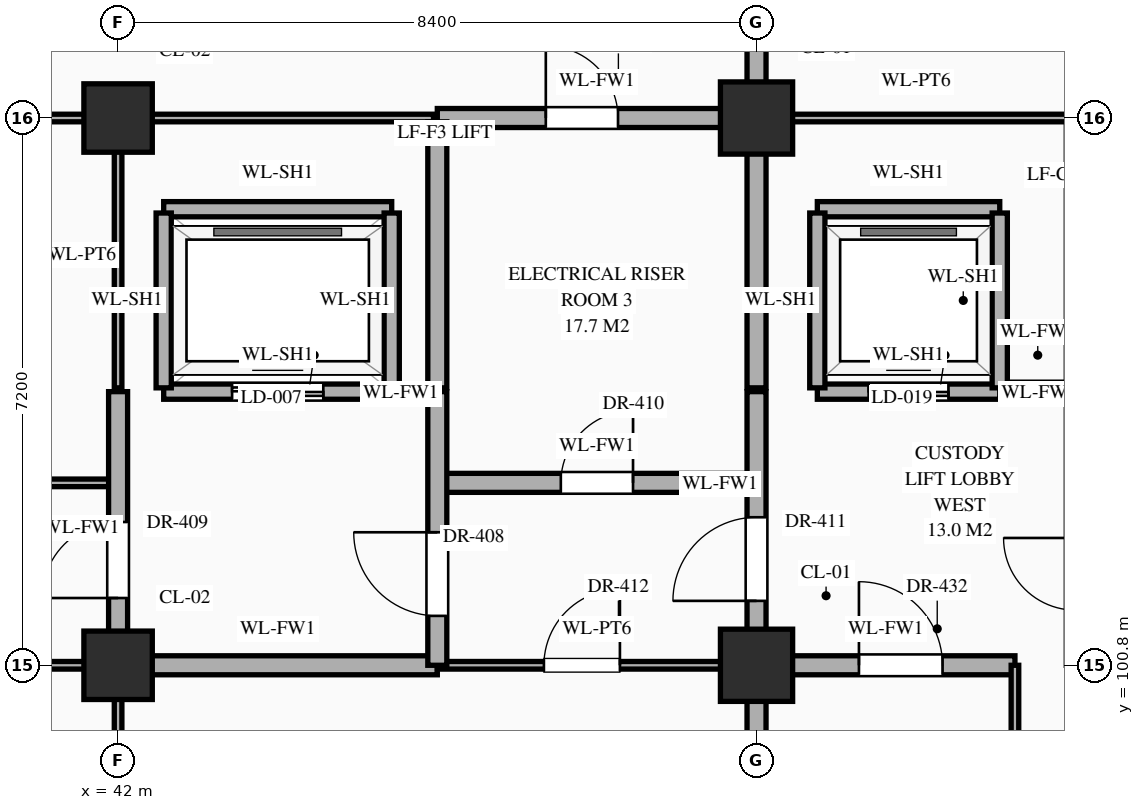
"""IFC4 building model, lengths in metres.
Left out: names, types, materials, properties, quantities, classifications, styles, units other than length and angle.
Written with IfcOpenShell. Run it as: python <this file> out.ifc"""

import sys

from ifc_helpers import new_model, si_unit, direction, frame, frame_2d, origin, origin_2d, place, context, subcontext, project, spatial, rectangle, extrude, element, fill, save


model = new_model("IFC4")
c1 = context("Model", 3, precision=1e-05, world=origin(), true_north=direction((0.0, 1.0)))
c2 = subcontext(c1, "Body", "Model", "MODEL_VIEW")
j1 = project(units=[si_unit("LENGTHUNIT", "METRE"), si_unit("PLANEANGLEUNIT", "RADIAN")], contexts=[c1])
p1 = place(None, origin())
s1 = spatial("IfcSite", under=j1, at=p1, CompositionType="ELEMENT")
p2 = place(p1, origin())
s2 = spatial("IfcBuilding", under=s1, at=p2, CompositionType="ELEMENT")
p3 = place(p2, frame((0.0, 0.0, -5.4)))
s3 = spatial("IfcBuildingStorey", under=s2, at=p3, CompositionType="ELEMENT", Elevation=-5.4)
for number, where, z_axis, x_axis in (
    (1, (42.0, 100.8, 0.0), (0.0, 0.0, 1.0), (1.0, 0.0, 0.0)),
    (2, (42.0, 108.0, 0.0), (0.0, 0.0, 1.0), (1.0, 0.0, 0.0)),
):
    element("IfcColumn", number, at=place(p3, frame(where, z_axis=z_axis, x_axis=x_axis)), inside=s3, PredefinedType="COLUMN", context=c2, shape_type="SweptSolid", body=[
        extrude(rectangle(XDim=0.9, YDim=0.9, at=origin_2d()), origin(), (0.0, 0.0, 1.0), 5.4),
    ])
for number, where, z_axis, x_axis in (
    (3, (50.4, 100.8, 0.0), (0.0, 0.0, 1.0), (1.0, 0.0, 0.0)),
    (4, (50.4, 108.0, 0.0), (0.0, 0.0, 1.0), (1.0, 0.0, 0.0)),
):
    element("IfcColumn", number, at=place(p3, frame(where, z_axis=z_axis, x_axis=x_axis)), inside=s3, PredefinedType="COLUMN", context=c2, shape_type="SweptSolid", body=[
        extrude(rectangle(XDim=0.95, YDim=0.95, at=origin_2d()), origin(), (0.0, 0.0, 1.0), 5.4),
    ])
p4 = place(p3, frame((16.8, 100.8, 0.0), z_axis=(0.0, 0.0, 1.0), x_axis=(1.0, 0.0, 0.0)))
e5 = element("IfcWall", 5, at=p4, inside=s3, PredefinedType="STANDARD", context=c2, shape_type="SweptSolid", body=[
    extrude(rectangle(XDim=25.2, YDim=0.1, at=frame_2d((12.6, 0.0))), origin(), (0.0, 0.0, 1.0), 4.25),
])
p5 = place(p4, frame((3.587, 0.0, 0.0)))
e6 = element("IfcOpeningElement", 6, at=p5, cuts=e5, PredefinedType="OPENING", context=c2, shape_type="SweptSolid", body=[
    extrude(rectangle(XDim=1.2, YDim=2.35, at=frame_2d((0.6, 1.175))), frame((0.0, 0.062, 0.0), z_axis=(0.0, -1.0, 0.0), x_axis=(1.0, 0.0, 0.0)), (0.0, 0.0, 1.0), 0.124),
])
p6 = place(p4, frame((9.665, 0.0, 0.0)))
e7 = element("IfcOpeningElement", 7, at=p6, cuts=e5, PredefinedType="OPENING", context=c2, shape_type="SweptSolid", body=[
    extrude(rectangle(XDim=1.24, YDim=2.3, at=frame_2d((0.62, 1.15))), frame((0.0, 0.062, 0.0), z_axis=(0.0, -1.0, 0.0), x_axis=(1.0, 0.0, 0.0)), (0.0, 0.0, 1.0), 0.124),
])
p7 = place(p4, frame((12.36, 0.0, 0.0)))
e8 = element("IfcOpeningElement", 8, at=p7, cuts=e5, PredefinedType="OPENING", context=c2, shape_type="SweptSolid", body=[
    extrude(rectangle(XDim=1.28, YDim=2.35, at=frame_2d((0.64, 1.175))), frame((0.0, 0.062, 0.0), z_axis=(0.0, -1.0, 0.0), x_axis=(1.0, 0.0, 0.0)), (0.0, 0.0, 1.0), 0.124),
])
p8 = place(p4, frame((14.845, 0.0, 0.0)))
e9 = element("IfcOpeningElement", 9, at=p8, cuts=e5, PredefinedType="OPENING", context=c2, shape_type="SweptSolid", body=[
    extrude(rectangle(XDim=0.94, YDim=2.3, at=frame_2d((0.47, 1.15))), frame((0.0, 0.062, 0.0), z_axis=(0.0, -1.0, 0.0), x_axis=(1.0, 0.0, 0.0)), (0.0, 0.0, 1.0), 0.124),
])
p9 = place(p4, frame((20.51, 0.0, 0.0)))
e10 = element("IfcOpeningElement", 10, at=p9, cuts=e5, PredefinedType="OPENING", context=c2, shape_type="SweptSolid", body=[
    extrude(rectangle(XDim=0.98, YDim=2.35, at=frame_2d((0.49, 1.175))), frame((0.0, 0.062, 0.0), z_axis=(0.0, -1.0, 0.0), x_axis=(1.0, 0.0, 0.0)), (0.0, 0.0, 1.0), 0.124),
])
p10 = place(p3, frame((42.0, 100.8, 0.0), z_axis=(0.0, 0.0, 1.0), x_axis=(1.0, 0.0, 0.0)))
e11 = element("IfcWall", 11, at=p10, inside=s3, PredefinedType="STANDARD", context=c2, shape_type="SweptSolid", body=[
    extrude(rectangle(XDim=4.2, YDim=0.25, at=frame_2d((2.1, 0.0))), origin(), (0.0, 0.0, 1.0), 4.25),
])
p11 = place(p3, frame((46.2, 100.8, 0.0), z_axis=(0.0, 0.0, 1.0), x_axis=(1.0, 0.0, 0.0)))
e12 = element("IfcWall", 12, at=p11, inside=s3, PredefinedType="STANDARD", context=c2, shape_type="SweptSolid", body=[
    extrude(rectangle(XDim=4.2, YDim=0.1, at=frame_2d((2.1, 0.0))), origin(), (0.0, 0.0, 1.0), 4.25),
])
p12 = place(p11, frame((1.403, 0.0, 0.0)))
e13 = element("IfcOpeningElement", 13, at=p12, cuts=e12, PredefinedType="OPENING", context=c2, shape_type="SweptSolid", body=[
    extrude(rectangle(XDim=1.0, YDim=2.25, at=frame_2d((0.5, 1.125))), frame((0.0, 0.062, 0.0), z_axis=(0.0, -1.0, 0.0), x_axis=(1.0, 0.0, 0.0)), (0.0, 0.0, 1.0), 0.124),
])
p13 = place(p3, frame((50.4, 100.8, 0.0), z_axis=(0.0, 0.0, 1.0), x_axis=(1.0, 0.0, 0.0)))
e14 = element("IfcWall", 14, at=p13, inside=s3, PredefinedType="STANDARD", context=c2, shape_type="SweptSolid", body=[
    extrude(rectangle(XDim=3.4, YDim=0.25, at=frame_2d((1.7, 0.0))), origin(), (0.0, 0.0, 1.0), 4.25),
])
p14 = place(p13, frame((1.347, 0.0, 0.0)))
e15 = element("IfcOpeningElement", 15, at=p14, cuts=e14, PredefinedType="OPENING", context=c2, shape_type="SweptSolid", body=[
    extrude(rectangle(XDim=1.1, YDim=2.2, at=frame_2d((0.55, 1.1))), frame((0.0, 0.137, 0.0), z_axis=(0.0, -1.0, 0.0), x_axis=(1.0, 0.0, 0.0)), (0.0, 0.0, 1.0), 0.274),
])
p15 = place(p3, frame((16.8, 103.2, 0.0), z_axis=(0.0, 0.0, 1.0), x_axis=(1.0, 0.0, 0.0)))
e16 = element("IfcWall", 16, at=p15, inside=s3, PredefinedType="STANDARD", context=c2, shape_type="SweptSolid", body=[
    extrude(rectangle(XDim=25.2, YDim=0.1, at=frame_2d((12.6, 0.0))), origin(), (0.0, 0.0, 1.0), 5.1),
])
p16 = place(p15, frame((3.66, 0.0, 0.0)))
e17 = element("IfcOpeningElement", 17, at=p16, cuts=e16, PredefinedType="OPENING", context=c2, shape_type="SweptSolid", body=[
    extrude(rectangle(XDim=1.08, YDim=2.25, at=frame_2d((0.54, 1.125))), frame((0.0, 0.062, 0.0), z_axis=(0.0, -1.0, 0.0), x_axis=(1.0, 0.0, 0.0)), (0.0, 0.0, 1.0), 0.124),
])
p17 = place(p15, frame((12.04, 0.0, 0.0)))
e18 = element("IfcOpeningElement", 18, at=p17, cuts=e16, PredefinedType="OPENING", context=c2, shape_type="SweptSolid", body=[
    extrude(rectangle(XDim=1.12, YDim=2.25, at=frame_2d((0.56, 1.125))), frame((0.0, 0.062, 0.0), z_axis=(0.0, -1.0, 0.0), x_axis=(1.0, 0.0, 0.0)), (0.0, 0.0, 1.0), 0.124),
])
p18 = place(p15, frame((20.42, 0.0, 0.0)))
e19 = element("IfcOpeningElement", 19, at=p18, cuts=e16, PredefinedType="OPENING", context=c2, shape_type="SweptSolid", body=[
    extrude(rectangle(XDim=1.16, YDim=2.3, at=frame_2d((0.58, 1.15))), frame((0.0, 0.062, 0.0), z_axis=(0.0, -1.0, 0.0), x_axis=(1.0, 0.0, 0.0)), (0.0, 0.0, 1.0), 0.124),
])
p19 = place(p3, frame((46.2, 103.2, 0.0), z_axis=(0.0, 0.0, 1.0), x_axis=(1.0, 0.0, 0.0)))
e20 = element("IfcWall", 20, at=p19, inside=s3, PredefinedType="STANDARD", context=c2, shape_type="SweptSolid", body=[
    extrude(rectangle(XDim=4.2, YDim=0.25, at=frame_2d((2.1, 0.0))), origin(), (0.0, 0.0, 1.0), 5.1),
])
p20 = place(p19, frame((1.625, 0.0, 0.0)))
e21 = element("IfcOpeningElement", 21, at=p20, cuts=e20, PredefinedType="OPENING", context=c2, shape_type="SweptSolid", body=[
    extrude(rectangle(XDim=0.95, YDim=2.15, at=frame_2d((0.475, 1.075))), frame((0.0, 0.137, 0.0), z_axis=(0.0, -1.0, 0.0), x_axis=(1.0, 0.0, 0.0)), (0.0, 0.0, 1.0), 0.274),
])
p21 = place(p3, frame((42.6, 104.4, 0.0), z_axis=(0.0, 0.0, 1.0), x_axis=(1.0, 0.0, 0.0)))
e22 = element("IfcWall", 22, at=p21, inside=s3, PredefinedType="STANDARD", context=c2, shape_type="SweptSolid", body=[
    extrude(rectangle(XDim=3.0, YDim=0.2, at=frame_2d((1.5, 0.0))), origin(), (0.0, 0.0, 1.0), 5.1),
])
p22 = place(p21, frame((0.9, 0.0, 0.0)))
e23 = element("IfcOpeningElement", 23, at=p22, cuts=e22, PredefinedType="OPENING", context=c2, shape_type="SweptSolid", body=[
    extrude(rectangle(XDim=1.2, YDim=2.15, at=frame_2d((0.6, 1.075))), frame((0.0, 0.112, 0.0), z_axis=(0.0, -1.0, 0.0), x_axis=(1.0, 0.0, 0.0)), (0.0, 0.0, 1.0), 0.224),
])
p23 = place(p3, frame((51.2, 104.4, 0.0), z_axis=(0.0, 0.0, 1.0), x_axis=(1.0, 0.0, 0.0)))
e24 = element("IfcWall", 24, at=p23, inside=s3, PredefinedType="STANDARD", context=c2, shape_type="SweptSolid", body=[
    extrude(rectangle(XDim=2.4, YDim=0.2, at=frame_2d((1.2, 0.0))), origin(), (0.0, 0.0, 1.0), 5.1),
])
p24 = place(p23, frame((0.675, 0.0, 0.0)))
e25 = element("IfcOpeningElement", 25, at=p24, cuts=e24, PredefinedType="OPENING", context=c2, shape_type="SweptSolid", body=[
    extrude(rectangle(XDim=1.05, YDim=2.15, at=frame_2d((0.525, 1.075))), frame((0.0, 0.112, 0.0), z_axis=(0.0, -1.0, 0.0), x_axis=(1.0, 0.0, 0.0)), (0.0, 0.0, 1.0), 0.224),
])
p25 = place(p3, frame((53.65, 104.4, 0.0), z_axis=(0.0, 0.0, 1.0), x_axis=(1.0, 0.0, 0.0)))
e26 = element("IfcWall", 26, at=p25, inside=s3, PredefinedType="STANDARD", context=c2, shape_type="SweptSolid", body=[
    extrude(rectangle(XDim=0.9, YDim=0.25, at=frame_2d((0.45, 0.0))), origin(), (0.0, 0.0, 1.0), 5.1),
])
p26 = place(p3, frame((42.6, 106.8, 0.0), z_axis=(0.0, 0.0, 1.0), x_axis=(1.0, 0.0, 0.0)))
e27 = element("IfcWall", 27, at=p26, inside=s3, PredefinedType="STANDARD", context=c2, shape_type="SweptSolid", body=[
    extrude(rectangle(XDim=3.0, YDim=0.2, at=frame_2d((1.5, 0.0))), origin(), (0.0, 0.0, 1.0), 5.1),
])
p27 = place(p3, frame((51.2, 106.8, 0.0), z_axis=(0.0, 0.0, 1.0), x_axis=(1.0, 0.0, 0.0)))
e28 = element("IfcWall", 28, at=p27, inside=s3, PredefinedType="STANDARD", context=c2, shape_type="SweptSolid", body=[
    extrude(rectangle(XDim=2.4, YDim=0.2, at=frame_2d((1.2, 0.0))), origin(), (0.0, 0.0, 1.0), 5.1),
])
p28 = place(p3, frame((16.8, 108.0, 0.0), z_axis=(0.0, 0.0, 1.0), x_axis=(1.0, 0.0, 0.0)))
e29 = element("IfcWall", 29, at=p28, inside=s3, PredefinedType="STANDARD", context=c2, shape_type="SweptSolid", body=[
    extrude(rectangle(XDim=25.2, YDim=0.1, at=frame_2d((12.6, 0.0))), origin(), (0.0, 0.0, 1.0), 4.13),
])
p29 = place(p28, frame((3.677, 0.0, 0.0)))
e30 = element("IfcOpeningElement", 30, at=p29, cuts=e29, PredefinedType="OPENING", context=c2, shape_type="SweptSolid", body=[
    extrude(rectangle(XDim=1.02, YDim=2.4, at=frame_2d((0.51, 1.2))), frame((0.0, 0.062, 0.0), z_axis=(0.0, -1.0, 0.0), x_axis=(1.0, 0.0, 0.0)), (0.0, 0.0, 1.0), 0.124),
])
p30 = place(p28, frame((12.07, 0.0, 0.0)))
e31 = element("IfcOpeningElement", 31, at=p30, cuts=e29, PredefinedType="OPENING", context=c2, shape_type="SweptSolid", body=[
    extrude(rectangle(XDim=1.06, YDim=2.4, at=frame_2d((0.53, 1.2))), frame((0.0, 0.062, 0.0), z_axis=(0.0, -1.0, 0.0), x_axis=(1.0, 0.0, 0.0)), (0.0, 0.0, 1.0), 0.124),
])
p31 = place(p28, frame((20.43, 0.0, 0.0)))
e32 = element("IfcOpeningElement", 32, at=p31, cuts=e29, PredefinedType="OPENING", context=c2, shape_type="SweptSolid", body=[
    extrude(rectangle(XDim=1.14, YDim=2.4, at=frame_2d((0.57, 1.2))), frame((0.0, 0.062, 0.0), z_axis=(0.0, -1.0, 0.0), x_axis=(1.0, 0.0, 0.0)), (0.0, 0.0, 1.0), 0.124),
])
p32 = place(p3, frame((42.05, 108.0, 0.0), z_axis=(0.0, 0.0, 1.0), x_axis=(1.0, 0.0, 0.0)))
e33 = element("IfcWall", 33, at=p32, inside=s3, PredefinedType="STANDARD", context=c2, shape_type="SweptSolid", body=[
    extrude(rectangle(XDim=4.1, YDim=0.1, at=frame_2d((2.05, 0.0))), origin(), (0.0, 0.0, 1.0), 4.13),
])
p33 = place(p3, frame((46.2, 108.0, 0.0), z_axis=(0.0, 0.0, 1.0), x_axis=(1.0, 0.0, 0.0)))
e34 = element("IfcWall", 34, at=p33, inside=s3, PredefinedType="STANDARD", context=c2, shape_type="SweptSolid", body=[
    extrude(rectangle(XDim=4.2, YDim=0.25, at=frame_2d((2.1, 0.0))), origin(), (0.0, 0.0, 1.0), 4.13),
])
p34 = place(p33, frame((1.427, 0.0, 0.0)))
e35 = element("IfcOpeningElement", 35, at=p34, cuts=e34, PredefinedType="OPENING", context=c2, shape_type="SweptSolid", body=[
    extrude(rectangle(XDim=0.95, YDim=2.15, at=frame_2d((0.475, 1.075))), frame((0.0, 0.137, 0.0), z_axis=(0.0, -1.0, 0.0), x_axis=(1.0, 0.0, 0.0)), (0.0, 0.0, 1.0), 0.274),
])
p35 = place(p3, frame((50.45, 108.0, 0.0), z_axis=(0.0, 0.0, 1.0), x_axis=(1.0, 0.0, 0.0)))
e36 = element("IfcWall", 36, at=p35, inside=s3, PredefinedType="STANDARD", context=c2, shape_type="SweptSolid", body=[
    extrude(rectangle(XDim=4.1, YDim=0.1, at=frame_2d((2.05, 0.0))), origin(), (0.0, 0.0, 1.0), 4.25),
])
p36 = place(p3, frame((42.0, 96.0, 0.0), z_axis=(0.0, 0.0, 1.0), x_axis=(0.0, 1.0, 0.0)))
e37 = element("IfcWall", 37, at=p36, inside=s3, PredefinedType="STANDARD", context=c2, shape_type="SweptSolid", body=[
    extrude(rectangle(XDim=4.8, YDim=0.1, at=frame_2d((2.4, 0.0))), origin(), (0.0, 0.0, 1.0), 4.35),
])
p37 = place(p3, frame((42.0, 100.8, 0.0), z_axis=(0.0, 0.0, 1.0), x_axis=(0.0, 1.0, 0.0)))
e38 = element("IfcWall", 38, at=p37, inside=s3, PredefinedType="STANDARD", context=c2, shape_type="SweptSolid", body=[
    extrude(rectangle(XDim=3.6, YDim=0.25, at=frame_2d((1.8, 0.0))), origin(), (0.0, 0.0, 1.0), 4.35),
])
p38 = place(p37, frame((0.885, 0.0, 0.0)))
e39 = element("IfcOpeningElement", 39, at=p38, cuts=e38, PredefinedType="OPENING", context=c2, shape_type="SweptSolid", body=[
    extrude(rectangle(XDim=1.0, YDim=2.2, at=frame_2d((0.5, 1.1))), frame((0.0, 0.137, 0.0), z_axis=(0.0, -1.0, 0.0), x_axis=(1.0, 0.0, 0.0)), (0.0, 0.0, 1.0), 0.274),
])
p39 = place(p3, frame((42.0, 104.45, 0.0), z_axis=(0.0, 0.0, 1.0), x_axis=(0.0, 1.0, 0.0)))
e40 = element("IfcWall", 40, at=p39, inside=s3, PredefinedType="STANDARD", context=c2, shape_type="SweptSolid", body=[
    extrude(rectangle(XDim=3.5, YDim=0.1, at=frame_2d((1.75, 0.0))), origin(), (0.0, 0.0, 1.0), 4.35),
])
for number, where, z_axis, x_axis in (
    (41, (42.6, 104.45, 0.0), (0.0, 0.0, 1.0), (0.0, 1.0, 0.0)),
    (42, (45.6, 104.45, 0.0), (0.0, 0.0, 1.0), (0.0, 1.0, 0.0)),
):
    element("IfcWall", number, at=place(p3, frame(where, z_axis=z_axis, x_axis=x_axis)), inside=s3, PredefinedType="STANDARD", context=c2, shape_type="SweptSolid", body=[
        extrude(rectangle(XDim=2.3, YDim=0.2, at=frame_2d((1.15, 0.0))), origin(), (0.0, 0.0, 1.0), 5.1),
    ])
p40 = place(p3, frame((46.2, 100.8, 0.0), z_axis=(0.0, 0.0, 1.0), x_axis=(0.0, 1.0, 0.0)))
e43 = element("IfcWall", 43, at=p40, inside=s3, PredefinedType="STANDARD", context=c2, shape_type="SweptSolid", body=[
    extrude(rectangle(XDim=3.6, YDim=0.25, at=frame_2d((1.8, 0.0))), origin(), (0.0, 0.0, 1.0), 4.65),
])
p41 = place(p40, frame((0.65, 0.0, 0.0)))
e44 = element("IfcOpeningElement", 44, at=p41, cuts=e43, PredefinedType="OPENING", context=c2, shape_type="SweptSolid", body=[
    extrude(rectangle(XDim=1.1, YDim=2.2, at=frame_2d((0.55, 1.1))), frame((0.0, 0.137, 0.0), z_axis=(0.0, -1.0, 0.0), x_axis=(1.0, 0.0, 0.0)), (0.0, 0.0, 1.0), 0.274),
])
p42 = place(p3, frame((46.2, 104.45, 0.0), z_axis=(0.0, 0.0, 1.0), x_axis=(0.0, 1.0, 0.0)))
e45 = element("IfcWall", 45, at=p42, inside=s3, PredefinedType="STANDARD", context=c2, shape_type="SweptSolid", body=[
    extrude(rectangle(XDim=3.5, YDim=0.25, at=frame_2d((1.75, 0.0))), origin(), (0.0, 0.0, 1.0), 4.65),
])
p43 = place(p3, frame((50.4, 91.2, 0.0), z_axis=(0.0, 0.0, 1.0), x_axis=(0.0, 1.0, 0.0)))
e46 = element("IfcWall", 46, at=p43, inside=s3, PredefinedType="STANDARD", context=c2, shape_type="SweptSolid", body=[
    extrude(rectangle(XDim=13.2, YDim=0.25, at=frame_2d((6.6, 0.0))), origin(), (0.0, 0.0, 1.0), 4.35),
])
p44 = place(p43, frame((0.528, 0.0, 0.0)))
e47 = element("IfcOpeningElement", 47, at=p44, cuts=e46, PredefinedType="OPENING", context=c2, shape_type="SweptSolid", body=[
    extrude(rectangle(XDim=0.95, YDim=2.15, at=frame_2d((0.475, 1.075))), frame((0.0, 0.137, 0.0), z_axis=(0.0, -1.0, 0.0), x_axis=(1.0, 0.0, 0.0)), (0.0, 0.0, 1.0), 0.274),
])
p45 = place(p43, frame((10.448, 0.0, 0.0)))
e48 = element("IfcOpeningElement", 48, at=p45, cuts=e46, PredefinedType="OPENING", context=c2, shape_type="SweptSolid", body=[
    extrude(rectangle(XDim=1.1, YDim=2.2, at=frame_2d((0.55, 1.1))), frame((0.0, 0.137, 0.0), z_axis=(0.0, -1.0, 0.0), x_axis=(1.0, 0.0, 0.0)), (0.0, 0.0, 1.0), 0.274),
])
p46 = place(p43, frame((3.248, 0.0, 0.0)))
e49 = element("IfcOpeningElement", 49, at=p46, cuts=e46, PredefinedType="OPENING", context=c2, shape_type="SweptSolid", body=[
    extrude(rectangle(XDim=1.1, YDim=2.2, at=frame_2d((0.55, 1.1))), frame((0.0, 0.137, 0.0), z_axis=(0.0, -1.0, 0.0), x_axis=(1.0, 0.0, 0.0)), (0.0, 0.0, 1.0), 0.274),
])
p47 = place(p3, frame((50.4, 104.45, 0.0), z_axis=(0.0, 0.0, 1.0), x_axis=(0.0, 1.0, 0.0)))
e50 = element("IfcWall", 50, at=p47, inside=s3, PredefinedType="STANDARD", context=c2, shape_type="SweptSolid", body=[
    extrude(rectangle(XDim=3.5, YDim=0.25, at=frame_2d((1.75, 0.0))), origin(), (0.0, 0.0, 1.0), 4.35),
])
p48 = place(p3, frame((50.4, 108.0, 0.0), z_axis=(0.0, 0.0, 1.0), x_axis=(0.0, 1.0, 0.0)))
e51 = element("IfcWall", 51, at=p48, inside=s3, PredefinedType="STANDARD", context=c2, shape_type="SweptSolid", body=[
    extrude(rectangle(XDim=7.16, YDim=0.25, at=frame_2d((3.58, 0.0))), origin(), (0.0, 0.0, 1.0), 4.23),
])
p49 = place(p48, frame((0.897, 0.0, 0.0)))
e52 = element("IfcOpeningElement", 52, at=p49, cuts=e51, PredefinedType="OPENING", context=c2, shape_type="SweptSolid", body=[
    extrude(rectangle(XDim=1.0, YDim=2.2, at=frame_2d((0.5, 1.1))), frame((0.0, 0.137, 0.0), z_axis=(0.0, -1.0, 0.0), x_axis=(1.0, 0.0, 0.0)), (0.0, 0.0, 1.0), 0.274),
])
for number, where, z_axis, x_axis in (
    (53, (51.2, 104.45, 0.0), (0.0, 0.0, 1.0), (0.0, 1.0, 0.0)),
    (54, (53.6, 104.45, 0.0), (0.0, 0.0, 1.0), (0.0, 1.0, 0.0)),
):
    element("IfcWall", number, at=place(p3, frame(where, z_axis=z_axis, x_axis=x_axis)), inside=s3, PredefinedType="STANDARD", context=c2, shape_type="SweptSolid", body=[
        extrude(rectangle(XDim=2.3, YDim=0.2, at=frame_2d((1.15, 0.0))), origin(), (0.0, 0.0, 1.0), 5.1),
    ])
p50 = place(p3, frame((53.8, 96.0, 0.0), z_axis=(0.0, 0.0, 1.0), x_axis=(0.0, 1.0, 0.0)))
e55 = element("IfcWall", 55, at=p50, inside=s3, PredefinedType="STANDARD", context=c2, shape_type="SweptSolid", body=[
    extrude(rectangle(XDim=4.8, YDim=0.1, at=frame_2d((2.4, 0.0))), origin(), (0.0, 0.0, 1.0), 5.1),
])
p51 = place(p50, frame((1.87, 0.0, 0.0)))
e56 = element("IfcOpeningElement", 56, at=p51, cuts=e55, PredefinedType="OPENING", context=c2, shape_type="SweptSolid", body=[
    extrude(rectangle(XDim=1.06, YDim=2.4, at=frame_2d((0.53, 1.2))), frame((0.0, 0.062, 0.0), z_axis=(0.0, -1.0, 0.0), x_axis=(1.0, 0.0, 0.0)), (0.0, 0.0, 1.0), 0.124),
])
p52 = place(p22, origin())
e57 = element("IfcDoor", 57, at=p52, inside=s3, OperationType="DOUBLE_DOOR_SLIDING", PredefinedType="DOOR", context=c2, shape_type="SweptSolid", body=[
    extrude(rectangle(XDim=1.2, YDim=2.15, at=frame_2d((0.6, 1.075))), frame((0.0, 0.025, 0.0), z_axis=(0.0, -1.0, 0.0), x_axis=(1.0, 0.0, 0.0)), (0.0, 0.0, 1.0), 0.05),
])
fill(e23, e57)
p53 = place(p24, origin())
e58 = element("IfcDoor", 58, at=p53, inside=s3, OperationType="DOUBLE_DOOR_SLIDING", PredefinedType="DOOR", context=c2, shape_type="SweptSolid", body=[
    extrude(rectangle(XDim=1.05, YDim=2.15, at=frame_2d((0.525, 1.075))), frame((0.0, 0.025, 0.0), z_axis=(0.0, -1.0, 0.0), x_axis=(1.0, 0.0, 0.0)), (0.0, 0.0, 1.0), 0.05),
])
fill(e25, e58)
p54 = place(p41, origin())
e59 = element("IfcDoor", 59, at=p54, inside=s3, OperationType="SINGLE_SWING_RIGHT", PredefinedType="DOOR", context=c2, shape_type="SweptSolid", body=[
    extrude(rectangle(XDim=1.1, YDim=2.2, at=frame_2d((0.55, 1.1))), frame((0.0, 0.025, 0.0), z_axis=(0.0, -1.0, 0.0), x_axis=(1.0, 0.0, 0.0)), (0.0, 0.0, 1.0), 0.05),
])
fill(e44, e59)
p55 = place(p38, origin())
e60 = element("IfcDoor", 60, at=p55, inside=s3, OperationType="SINGLE_SWING_LEFT", PredefinedType="DOOR", context=c2, shape_type="SweptSolid", body=[
    extrude(rectangle(XDim=1.0, YDim=2.2, at=frame_2d((0.5, 1.1))), frame((0.0, 0.025, 0.0), z_axis=(0.0, -1.0, 0.0), x_axis=(1.0, 0.0, 0.0)), (0.0, 0.0, 1.0), 0.05),
])
fill(e39, e60)
p56 = place(p20, origin())
e61 = element("IfcDoor", 61, at=p56, inside=s3, OperationType="SINGLE_SWING_RIGHT", PredefinedType="DOOR", context=c2, shape_type="SweptSolid", body=[
    extrude(rectangle(XDim=0.95, YDim=2.15, at=frame_2d((0.475, 1.075))), frame((0.0, 0.025, 0.0), z_axis=(0.0, -1.0, 0.0), x_axis=(1.0, 0.0, 0.0)), (0.0, 0.0, 1.0), 0.05),
])
fill(e21, e61)
p57 = place(p45, origin())
e62 = element("IfcDoor", 62, at=p57, inside=s3, OperationType="SINGLE_SWING_LEFT", PredefinedType="DOOR", context=c2, shape_type="SweptSolid", body=[
    extrude(rectangle(XDim=1.1, YDim=2.2, at=frame_2d((0.55, 1.1))), frame((0.0, 0.025, 0.0), z_axis=(0.0, -1.0, 0.0), x_axis=(1.0, 0.0, 0.0)), (0.0, 0.0, 1.0), 0.05),
])
fill(e48, e62)
p58 = place(p12, origin())
e63 = element("IfcDoor", 63, at=p58, inside=s3, OperationType="SINGLE_SWING_RIGHT", PredefinedType="DOOR", context=c2, shape_type="SweptSolid", body=[
    extrude(rectangle(XDim=1.0, YDim=2.25, at=frame_2d((0.5, 1.125))), frame((0.0, 0.025, 0.0), z_axis=(0.0, -1.0, 0.0), x_axis=(1.0, 0.0, 0.0)), (0.0, 0.0, 1.0), 0.05),
])
fill(e13, e63)
p59 = place(p34, origin())
e64 = element("IfcDoor", 64, at=p59, inside=s3, OperationType="SINGLE_SWING_LEFT", PredefinedType="DOOR", context=c2, shape_type="SweptSolid", body=[
    extrude(rectangle(XDim=0.95, YDim=2.15, at=frame_2d((0.475, 1.075))), frame((0.0, 0.025, 0.0), z_axis=(0.0, -1.0, 0.0), x_axis=(1.0, 0.0, 0.0)), (0.0, 0.0, 1.0), 0.05),
])
fill(e35, e64)
p60 = place(p14, origin())
e65 = element("IfcDoor", 65, at=p60, inside=s3, OperationType="SINGLE_SWING_LEFT", PredefinedType="DOOR", context=c2, shape_type="SweptSolid", body=[
    extrude(rectangle(XDim=1.1, YDim=2.2, at=frame_2d((0.55, 1.1))), frame((0.0, 0.025, 0.0), z_axis=(0.0, -1.0, 0.0), x_axis=(1.0, 0.0, 0.0)), (0.0, 0.0, 1.0), 0.05),
])
fill(e15, e65)
save(model, sys.argv[1])
